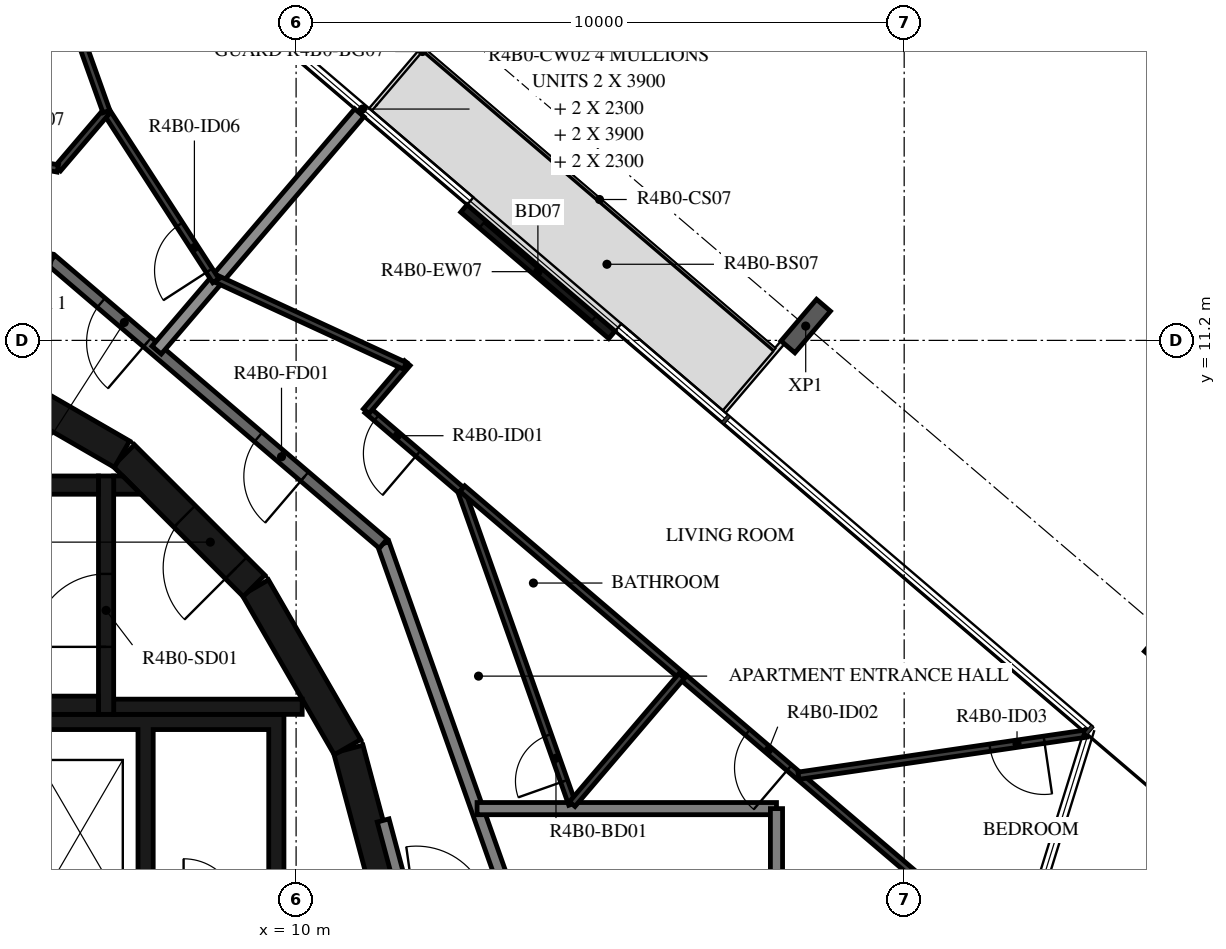
"""IFC4 building model, lengths in metres.
Left out: names, types, materials, properties, quantities, classifications, styles, units other than length and angle.
Written with IfcOpenShell. Run it as: python <this file> out.ifc"""

import sys

from ifc_helpers import new_model, si_unit, direction, frame, frame_2d, origin, origin_2d, place, context, subcontext, project, spatial, polyline, rectangle, i_section, outline, extrude, element, fill, save


model = new_model("IFC4")
c1 = context("Model", 3, precision=1e-05, world=origin(), true_north=direction((0.0, 1.0)))
c2 = subcontext(c1, "Body", "Model", "MODEL_VIEW")
j1 = project(units=[si_unit("LENGTHUNIT", "METRE"), si_unit("PLANEANGLEUNIT", "RADIAN")], contexts=[c1])
p1 = place(None, origin())
s1 = spatial("IfcSite", under=j1, at=p1, CompositionType="ELEMENT")
p2 = place(p1, origin())
s2 = spatial("IfcBuilding", under=s1, at=p2, CompositionType="ELEMENT")
p3 = place(p2, frame((0.0, 0.0, 165.7)))
s3 = spatial("IfcBuildingStorey", under=s2, at=p3, CompositionType="ELEMENT", Elevation=165.7)
for number, where, z_axis, x_axis in (
    (1, (24.358, 6.331, -0.38), (0.0, 0.0, 1.0), (0.76, -0.649, 0.0)),
    (2, (18.381, 11.436, -0.38), (0.0, 0.0, 1.0), (0.76, -0.649, 0.0)),
):
    element("IfcColumn", number, at=place(p3, frame(where, z_axis=z_axis, x_axis=x_axis)), inside=s3, PredefinedType="COLUMN", context=c2, shape_type="SweptSolid", body=[
        extrude(i_section(OverallWidth=0.3, OverallDepth=0.9, WebThickness=0.019, FlangeThickness=0.035, FilletRadius=0.03, at=origin_2d()), origin(), (0.0, 0.0, 1.0), 3.5),
    ])
p4 = place(p3, frame((15.193, 11.291, 0.0), z_axis=(0.0, 0.0, 1.0), x_axis=(-0.760391731187, 0.649464714317, 0.0)))
e3 = element("IfcWall", 3, at=p4, inside=s3, PredefinedType="STANDARD", context=c2, shape_type="SweptSolid", body=[
    extrude(rectangle(XDim=3.2, YDim=0.16, at=frame_2d((1.6, 0.0))), origin(), (0.0, 0.0, 1.0), 3.12),
])
p5 = place(p4, frame((0.4, 0.0, 0.0)))
e4 = element("IfcOpeningElement", 4, at=p5, cuts=e3, PredefinedType="OPENING", context=c2, shape_type="SweptSolid", body=[
    extrude(rectangle(XDim=2.4, YDim=2.4, at=frame_2d((1.2, 1.2))), frame((0.0, 0.09, 0.0), z_axis=(0.0, -1.0, 0.0), x_axis=(1.0, 0.0, 0.0)), (0.0, 0.0, 1.0), 0.18),
])
for number, where, z_axis, x_axis in (
    (5, (11.643, 1.55, 0.0), (0.0, 0.0, 1.0), (-0.259, 0.966, 0.0)),
    (6, (10.845, 4.51, 0.0), (0.0, 0.0, 1.0), (-0.5, 0.866, 0.0)),
):
    element("IfcWall", number, at=place(p3, frame(where, z_axis=z_axis, x_axis=x_axis)), inside=s3, PredefinedType="SHEAR", context=c2, shape_type="SweptSolid", body=[
        extrude(rectangle(XDim=3.033, YDim=0.5, at=frame_2d((1.516, 0.0))), origin(), (0.0, 0.0, 1.0), 3.12),
    ])
p6 = place(p3, frame((9.308, 7.164, 0.0), z_axis=(0.0, 0.0, 1.0), x_axis=(-0.707106781187, 0.707106781187, 0.0)))
e7 = element("IfcWall", 7, at=p6, inside=s3, PredefinedType="SHEAR", context=c2, shape_type="SweptSolid", body=[
    extrude(rectangle(XDim=3.032, YDim=0.5, at=frame_2d((1.516, 0.0))), origin(), (0.0, 0.0, 1.0), 3.12),
])
p7 = place(p6, frame((0.416, 0.0, 0.0)))
e8 = element("IfcOpeningElement", 8, at=p7, cuts=e7, PredefinedType="OPENING", context=c2, shape_type="SweptSolid", body=[
    extrude(rectangle(XDim=1.2, YDim=2.1, at=frame_2d((0.6, 1.05))), frame((0.0, 0.26, 0.0), z_axis=(0.0, -1.0, 0.0), x_axis=(1.0, 0.0, 0.0)), (0.0, 0.0, 1.0), 0.52),
])
p8 = place(p3, frame((7.137, 9.329, 0.0), z_axis=(0.0, 0.0, 1.0), x_axis=(-0.865975092491, 0.500087131594, 0.0)))
e9 = element("IfcWall", 9, at=p8, inside=s3, PredefinedType="SHEAR", context=c2, shape_type="SweptSolid", body=[
    extrude(rectangle(XDim=3.033, YDim=0.5, at=frame_2d((1.516, 0.0))), origin(), (0.0, 0.0, 1.0), 3.12),
])
for number, where, z_axis, x_axis in (
    (10, (0.0, 5.2, 0.0), (0.0, 0.0, 1.0), (1.0, 0.0, 0.0)),
    (11, (0.0, 8.82, 0.0), (0.0, 0.0, 1.0), (1.0, 0.0, 0.0)),
):
    element("IfcWall", number, at=place(p3, frame(where, z_axis=z_axis, x_axis=x_axis)), inside=s3, PredefinedType="SHEAR", context=c2, shape_type="SweptSolid", body=[
        extrude(rectangle(XDim=6.75, YDim=0.3, at=frame_2d((3.375, 0.0))), origin(), (0.0, 0.0, 1.0), 3.12),
    ])
p9 = place(p3, frame((6.875, 5.05, 0.0), z_axis=(0.0, 0.0, 1.0), x_axis=(0.0, 1.0, 0.0)))
e12 = element("IfcWall", 12, at=p9, inside=s3, PredefinedType="SHEAR", context=c2, shape_type="SweptSolid", body=[
    extrude(rectangle(XDim=3.92, YDim=0.25, at=frame_2d((1.96, 0.0))), origin(), (0.0, 0.0, 1.0), 3.12),
])
p10 = place(p9, frame((1.11, 0.0, 0.0)))
e13 = element("IfcOpeningElement", 13, at=p10, cuts=e12, PredefinedType="OPENING", context=c2, shape_type="SweptSolid", body=[
    extrude(rectangle(XDim=1.2, YDim=2.1, at=frame_2d((0.6, 1.05))), frame((0.0, 0.135, 0.0), z_axis=(0.0, -1.0, 0.0), x_axis=(1.0, 0.0, 0.0)), (0.0, 0.0, 1.0), 0.27),
])
p11 = place(p3, frame((7.0, 5.175, 0.0), z_axis=(0.0, 0.0, 1.0), x_axis=(1.0, 0.0, 0.0)))
e14 = element("IfcWall", 14, at=p11, inside=s3, PredefinedType="SHEAR", context=c2, shape_type="SweptSolid", body=[
    extrude(rectangle(XDim=3.1, YDim=0.25, at=frame_2d((1.55, 0.0))), origin(), (0.0, 0.0, 1.0), 3.12),
])
p12 = place(p3, origin())
e15 = element("IfcWall", 15, at=p12, inside=s3, PredefinedType="SHEAR", context=c2, shape_type="SweptSolid", body=[
    extrude(outline(polyline([(7.448, 8.67), (7.0, 8.67), (7.0, 8.97), (7.148, 8.97), (7.448, 8.67)])), origin(), (0.0, 0.0, 1.0), 3.12),
])
p13 = place(p3, origin())
e16 = element("IfcWall", 16, at=p13, inside=s3, PredefinedType="SHEAR", context=c2, shape_type="SweptSolid", body=[
    extrude(outline(polyline([(-9.55, 4.8), (-5.5, 4.8), (-5.5, 1.9), (-5.25, 1.9), (-5.25, 4.8), (-1.2, 4.8), (-1.2, 1.9), (-0.95, 1.9), (-0.95, 4.8), (0.95, 4.8), (0.95, 1.9), (1.2, 1.9), (1.2, 4.8), (3.1, 4.8), (3.1, 1.9), (3.35, 1.9), (3.35, 4.8), (5.25, 4.8), (5.25, 1.9), (5.5, 1.9), (5.5, 4.8), (7.4, 4.8), (7.4, 1.9), (7.65, 1.9), (7.65, 4.8), (9.55, 4.8), (9.55, 1.9), (9.8, 1.9), (9.8, 4.8), (9.8, 5.05), (-9.8, 5.05), (-9.8, 4.8), (-9.8, 1.9), (-9.55, 1.9), (-9.55, 4.8)])), origin(), (0.0, 0.0, 1.0), 3.12),
])
p14 = place(p3, frame((11.87, 1.668, 0.0), z_axis=(0.0, 0.0, 1.0), x_axis=(-0.258836880648, 0.965921047093, 0.0)))
e17 = element("IfcWall", 17, at=p14, inside=s3, PredefinedType="STANDARD", context=c2, shape_type="SweptSolid", body=[
    extrude(rectangle(XDim=1.695, YDim=0.2, at=frame_2d((0.848, 0.0))), origin(), (0.0, 0.0, 1.0), 3.12),
])
p15 = place(p3, frame((13.542, 1.903, 0.0), z_axis=(0.0, 0.0, 1.0), x_axis=(-0.333808508206, 0.942640907159, 0.0)))
e18 = element("IfcWall", 18, at=p15, inside=s3, PredefinedType="STANDARD", context=c2, shape_type="SweptSolid", body=[
    extrude(rectangle(XDim=6.317, YDim=0.2, at=frame_2d((3.158, 0.0))), origin(), (0.0, 0.0, 1.0), 3.12),
])
p16 = place(p3, frame((11.433, 7.858, 0.0), z_axis=(0.0, 0.0, 1.0), x_axis=(-0.760412154545, 0.649440801937, 0.0)))
e19 = element("IfcWall", 19, at=p16, inside=s3, PredefinedType="STANDARD", context=c2, shape_type="SweptSolid", body=[
    extrude(rectangle(XDim=7.181, YDim=0.2, at=frame_2d((3.59, 0.0))), origin(), (0.0, 0.0, 1.0), 3.12),
])
p17 = place(p16, frame((1.7, 0.0, 0.0)))
e20 = element("IfcOpeningElement", 20, at=p17, cuts=e19, PredefinedType="OPENING", context=c2, shape_type="SweptSolid", body=[
    extrude(rectangle(XDim=1.0, YDim=2.1, at=frame_2d((0.5, 1.05))), frame((0.0, 0.11, 0.0), z_axis=(0.0, -1.0, 0.0), x_axis=(1.0, 0.0, 0.0)), (0.0, 0.0, 1.0), 0.22),
])
p18 = place(p16, frame((5.101, 0.0, 0.0)))
e21 = element("IfcOpeningElement", 21, at=p18, cuts=e19, PredefinedType="OPENING", context=c2, shape_type="SweptSolid", body=[
    extrude(rectangle(XDim=1.0, YDim=2.1, at=frame_2d((0.5, 1.05))), frame((0.0, 0.11, 0.0), z_axis=(0.0, -1.0, 0.0), x_axis=(1.0, 0.0, 0.0)), (0.0, 0.0, 1.0), 0.22),
])
p19 = place(p3, frame((17.9, 3.5, 0.0), z_axis=(0.0, 0.0, 1.0), x_axis=(-1.0, 0.0, 0.0)))
e22 = element("IfcWall", 22, at=p19, inside=s3, PredefinedType="STANDARD", context=c2, shape_type="SweptSolid", body=[
    extrude(rectangle(XDim=4.924, YDim=0.2, at=frame_2d((2.462, 0.0))), origin(), (0.0, 0.0, 1.0), 3.12),
])
p20 = place(p3, frame((17.9, -3.318, 0.0), z_axis=(0.0, 0.0, 1.0), x_axis=(0.0, 1.0, 0.0)))
e23 = element("IfcWall", 23, at=p20, inside=s3, PredefinedType="STANDARD", context=c2, shape_type="SweptSolid", body=[
    extrude(rectangle(XDim=6.818, YDim=0.2, at=frame_2d((3.409, 0.0))), origin(), (0.0, 0.0, 1.0), 3.12),
])
p21 = place(p3, frame((11.04, 14.943, 0.0), z_axis=(0.0, 0.0, 1.0), x_axis=(-0.649442880087, -0.760410379666, 0.0)))
e24 = element("IfcWall", 24, at=p21, inside=s3, PredefinedType="STANDARD", context=c2, shape_type="SweptSolid", body=[
    extrude(rectangle(XDim=5.133, YDim=0.2, at=frame_2d((2.566, 0.0))), origin(), (0.0, 0.0, 1.0), 2.73),
])
p22 = place(p3, frame((14.541, 3.575, 0.0), z_axis=(0.0, 0.0, 1.0), x_axis=(-0.333799280318, 0.942644174893, 0.0)))
e25 = element("IfcWall", 25, at=p22, inside=s3, PredefinedType="PARTITIONING", context=c2, shape_type="SweptSolid", body=[
    extrude(rectangle(XDim=5.477, YDim=0.12, at=frame_2d((2.738, 0.0))), origin(), (0.0, 0.0, 1.0), 3.12),
])
p23 = place(p22, frame((0.4, 0.0, 0.0)))
e26 = element("IfcOpeningElement", 26, at=p23, cuts=e25, PredefinedType="OPENING", context=c2, shape_type="SweptSolid", body=[
    extrude(rectangle(XDim=0.8, YDim=2.1, at=frame_2d((0.4, 1.05))), frame((0.0, 0.07, 0.0), z_axis=(0.0, -1.0, 0.0), x_axis=(1.0, 0.0, 0.0)), (0.0, 0.0, 1.0), 0.14),
])
p24 = place(p3, frame((12.713, 8.737, 0.0), z_axis=(0.0, 0.0, 1.0), x_axis=(-0.760410825807, 0.649442357716, 0.0)))
e27 = element("IfcWall", 27, at=p24, inside=s3, PredefinedType="PARTITIONING", context=c2, shape_type="SweptSolid", body=[
    extrude(rectangle(XDim=2.029, YDim=0.12, at=frame_2d((1.014, 0.0))), origin(), (0.0, 0.0, 1.0), 3.12),
])
p25 = place(p24, frame((0.929, 0.0, 0.0)))
e28 = element("IfcOpeningElement", 28, at=p25, cuts=e27, PredefinedType="OPENING", context=c2, shape_type="SweptSolid", body=[
    extrude(rectangle(XDim=0.9, YDim=2.1, at=frame_2d((0.45, 1.05))), frame((0.0, 0.07, 0.0), z_axis=(0.0, -1.0, 0.0), x_axis=(1.0, 0.0, 0.0)), (0.0, 0.0, 1.0), 0.14),
])
p26 = place(p3, frame((12.734, 8.762, 0.0), z_axis=(0.0, 0.0, 1.0), x_axis=(0.760390484255, -0.649466174219, 0.0)))
e29 = element("IfcWall", 29, at=p26, inside=s3, PredefinedType="PARTITIONING", context=c2, shape_type="SweptSolid", body=[
    extrude(rectangle(XDim=4.783, YDim=0.12, at=frame_2d((2.391, 0.0))), origin(), (0.0, 0.0, 1.0), 3.12),
])
p27 = place(p3, frame((11.153, 10.034, 0.0), z_axis=(0.0, 0.0, 1.0), x_axis=(0.649381401329, 0.760462882466, 0.0)))
e30 = element("IfcWall", 30, at=p27, inside=s3, PredefinedType="PARTITIONING", context=c2, shape_type="SweptSolid", body=[
    extrude(rectangle(XDim=1.042, YDim=0.12, at=frame_2d((0.521, 0.0))), origin(), (0.0, 0.0, 1.0), 3.12),
])
p28 = place(p3, frame((11.79, 10.781, 0.0), z_axis=(0.0, 0.0, 1.0), x_axis=(-0.907999296286, 0.418971691101, 0.0)))
e31 = element("IfcWall", 31, at=p28, inside=s3, PredefinedType="PARTITIONING", context=c2, shape_type="SweptSolid", body=[
    extrude(rectangle(XDim=3.401, YDim=0.12, at=frame_2d((1.701, 0.0))), origin(), (0.0, 0.0, 1.0), 3.12),
])
p29 = place(p3, frame((23.411, -0.357, 0.0), z_axis=(0.0, 0.0, 1.0), x_axis=(-0.76041871148, 0.649433124525, 0.0)))
e32 = element("IfcWall", 32, at=p29, inside=s3, PredefinedType="PARTITIONING", context=c2, shape_type="SweptSolid", body=[
    extrude(rectangle(XDim=9.259, YDim=0.12, at=frame_2d((4.629, 0.0))), origin(), (0.0, 0.0, 1.0), 3.12),
])
p30 = place(p29, frame((6.972, 0.0, 0.0)))
e33 = element("IfcOpeningElement", 33, at=p30, cuts=e32, PredefinedType="OPENING", context=c2, shape_type="SweptSolid", body=[
    extrude(rectangle(XDim=0.9, YDim=2.1, at=frame_2d((0.45, 1.05))), frame((0.0, 0.07, 0.0), z_axis=(0.0, -1.0, 0.0), x_axis=(1.0, 0.0, 0.0)), (0.0, 0.0, 1.0), 0.14),
])
p31 = place(p29, frame((0.2, 0.0, 0.0)))
e34 = element("IfcOpeningElement", 34, at=p31, cuts=e32, PredefinedType="OPENING", context=c2, shape_type="SweptSolid", body=[
    extrude(rectangle(XDim=0.9, YDim=2.1, at=frame_2d((0.45, 1.05))), frame((0.0, 0.07, 0.0), z_axis=(0.0, -1.0, 0.0), x_axis=(1.0, 0.0, 0.0)), (0.0, 0.0, 1.0), 0.14),
])
p32 = place(p3, frame((16.341, 5.682, 0.0), z_axis=(0.0, 0.0, 1.0), x_axis=(-0.64946993237, -0.76038727432, 0.0)))
e35 = element("IfcWall", 35, at=p32, inside=s3, PredefinedType="PARTITIONING", context=c2, shape_type="SweptSolid", body=[
    extrude(rectangle(XDim=2.771, YDim=0.12, at=frame_2d((1.386, 0.0))), origin(), (0.0, 0.0, 1.0), 3.12),
])
p33 = place(p3, frame((22.994, 4.734, 0.0), z_axis=(0.0, 0.0, 1.0), x_axis=(-0.989449286977, -0.144879634529, 0.0)))
e36 = element("IfcWall", 36, at=p33, inside=s3, PredefinedType="PARTITIONING", context=c2, shape_type="SweptSolid", body=[
    extrude(rectangle(XDim=4.782, YDim=0.12, at=frame_2d((2.391, 0.0))), origin(), (0.0, 0.0, 1.0), 3.12),
])
p34 = place(p33, frame((0.7, 0.0, 0.0)))
e37 = element("IfcOpeningElement", 37, at=p34, cuts=e36, PredefinedType="OPENING", context=c2, shape_type="SweptSolid", body=[
    extrude(rectangle(XDim=0.9, YDim=2.1, at=frame_2d((0.45, 1.05))), frame((0.0, 0.07, 0.0), z_axis=(0.0, -1.0, 0.0), x_axis=(1.0, 0.0, 0.0)), (0.0, 0.0, 1.0), 0.14),
])
p35 = place(p3, frame((8.681, 12.181, 0.0), z_axis=(0.0, 0.0, 1.0), x_axis=(-0.543187118914, 0.839611668479, 0.0)))
e38 = element("IfcWall", 38, at=p35, inside=s3, PredefinedType="PARTITIONING", context=c2, shape_type="SweptSolid", body=[
    extrude(rectangle(XDim=3.313, YDim=0.12, at=frame_2d((1.657, 0.0))), origin(), (0.0, 0.0, 1.0), 3.12),
])
p36 = place(p35, frame((0.2, 0.0, 0.0)))
e39 = element("IfcOpeningElement", 39, at=p36, cuts=e38, PredefinedType="OPENING", context=c2, shape_type="SweptSolid", body=[
    extrude(rectangle(XDim=0.9, YDim=2.1, at=frame_2d((0.45, 1.05))), frame((0.0, 0.07, 0.0), z_axis=(0.0, -1.0, 0.0), x_axis=(1.0, 0.0, 0.0)), (0.0, 0.0, 1.0), 0.14),
])
p37 = place(p3, frame((6.881, 14.963, 0.0), z_axis=(0.0, 0.0, 1.0), x_axis=(-0.649402250594, -0.760445078177, 0.0)))
e40 = element("IfcWall", 40, at=p37, inside=s3, PredefinedType="PARTITIONING", context=c2, shape_type="SweptSolid", body=[
    extrude(rectangle(XDim=1.231, YDim=0.12, at=frame_2d((0.616, 0.0))), origin(), (0.0, 0.0, 1.0), 3.12),
])
p38 = place(p3, frame((6.081, 14.027, 0.0), z_axis=(0.0, 0.0, 1.0), x_axis=(-0.983250989832, 0.182256662416, 0.0)))
e41 = element("IfcWall", 41, at=p38, inside=s3, PredefinedType="PARTITIONING", context=c2, shape_type="SweptSolid", body=[
    extrude(rectangle(XDim=7.416, YDim=0.12, at=frame_2d((3.708, 0.0))), origin(), (0.0, 0.0, 1.0), 3.12),
])
p39 = place(p38, frame((0.2, 0.0, 0.0)))
e42 = element("IfcOpeningElement", 42, at=p39, cuts=e41, PredefinedType="OPENING", context=c2, shape_type="SweptSolid", body=[
    extrude(rectangle(XDim=0.9, YDim=2.1, at=frame_2d((0.45, 1.05))), frame((0.0, 0.07, 0.0), z_axis=(0.0, -1.0, 0.0), x_axis=(1.0, 0.0, 0.0)), (0.0, 0.0, 1.0), 0.14),
])
p40 = place(p38, frame((4.065, 0.0, 0.0)))
e43 = element("IfcOpeningElement", 43, at=p40, cuts=e41, PredefinedType="OPENING", context=c2, shape_type="SweptSolid", body=[
    extrude(rectangle(XDim=0.8, YDim=2.1, at=frame_2d((0.4, 1.05))), frame((0.0, 0.07, 0.0), z_axis=(0.0, -1.0, 0.0), x_axis=(1.0, 0.0, 0.0)), (0.0, 0.0, 1.0), 0.14),
])
p41 = place(p3, frame((5.043, 20.105, 0.0), z_axis=(0.0, 0.0, 1.0), x_axis=(0.336608273763, -0.941644768495, 0.0)))
e44 = element("IfcWall", 44, at=p41, inside=s3, PredefinedType="PARTITIONING", context=c2, shape_type="SweptSolid", body=[
    extrude(rectangle(XDim=5.461, YDim=0.12, at=frame_2d((2.73, 0.0))), origin(), (0.0, 0.0, 1.0), 3.12),
])
p42 = place(p5, origin())
e45 = element("IfcDoor", 45, at=p42, inside=s3, OperationType="DOUBLE_DOOR_SLIDING", PredefinedType="DOOR", context=c2, shape_type="SweptSolid", body=[
    extrude(rectangle(XDim=2.4, YDim=2.4, at=frame_2d((1.2, 1.2))), frame((0.0, 0.025, 0.0), z_axis=(0.0, -1.0, 0.0), x_axis=(1.0, 0.0, 0.0)), (0.0, 0.0, 1.0), 0.05),
])
fill(e4, e45)
p43 = place(p10, origin())
e46 = element("IfcDoor", 46, at=p43, inside=s3, OperationType="SINGLE_SWING_LEFT", PredefinedType="DOOR", context=c2, shape_type="SweptSolid", body=[
    extrude(rectangle(XDim=1.2, YDim=2.1, at=frame_2d((0.6, 1.05))), frame((0.0, 0.025, 0.0), z_axis=(0.0, -1.0, 0.0), x_axis=(1.0, 0.0, 0.0)), (0.0, 0.0, 1.0), 0.05),
])
fill(e13, e46)
p44 = place(p7, origin())
e47 = element("IfcDoor", 47, at=p44, inside=s3, OperationType="SINGLE_SWING_RIGHT", PredefinedType="DOOR", context=c2, shape_type="SweptSolid", body=[
    extrude(rectangle(XDim=1.2, YDim=2.1, at=frame_2d((0.6, 1.05))), frame((0.0, 0.025, 0.0), z_axis=(0.0, -1.0, 0.0), x_axis=(1.0, 0.0, 0.0)), (0.0, 0.0, 1.0), 0.05),
])
fill(e8, e47)
p45 = place(p17, origin())
e48 = element("IfcDoor", 48, at=p45, inside=s3, OperationType="SINGLE_SWING_LEFT", PredefinedType="DOOR", context=c2, shape_type="SweptSolid", body=[
    extrude(rectangle(XDim=1.0, YDim=2.1, at=frame_2d((0.5, 1.05))), frame((0.0, 0.025, 0.0), z_axis=(0.0, -1.0, 0.0), x_axis=(1.0, 0.0, 0.0)), (0.0, 0.0, 1.0), 0.05),
])
fill(e20, e48)
p46 = place(p23, origin())
e49 = element("IfcDoor", 49, at=p46, inside=s3, OperationType="SINGLE_SWING_LEFT", PredefinedType="DOOR", context=c2, shape_type="SweptSolid", body=[
    extrude(rectangle(XDim=0.8, YDim=2.1, at=frame_2d((0.4, 1.05))), frame((0.0, 0.025, 0.0), z_axis=(0.0, -1.0, 0.0), x_axis=(1.0, 0.0, 0.0)), (0.0, 0.0, 1.0), 0.05),
])
fill(e26, e49)
p47 = place(p25, origin())
e50 = element("IfcDoor", 50, at=p47, inside=s3, OperationType="SINGLE_SWING_LEFT", PredefinedType="DOOR", context=c2, shape_type="SweptSolid", body=[
    extrude(rectangle(XDim=0.9, YDim=2.1, at=frame_2d((0.45, 1.05))), frame((0.0, 0.025, 0.0), z_axis=(0.0, -1.0, 0.0), x_axis=(1.0, 0.0, 0.0)), (0.0, 0.0, 1.0), 0.05),
])
fill(e28, e50)
p48 = place(p30, origin())
e51 = element("IfcDoor", 51, at=p48, inside=s3, OperationType="SINGLE_SWING_RIGHT", PredefinedType="DOOR", context=c2, shape_type="SweptSolid", body=[
    extrude(rectangle(XDim=0.9, YDim=2.1, at=frame_2d((0.45, 1.05))), frame((0.0, 0.025, 0.0), z_axis=(0.0, -1.0, 0.0), x_axis=(1.0, 0.0, 0.0)), (0.0, 0.0, 1.0), 0.05),
])
fill(e33, e51)
p49 = place(p34, origin())
e52 = element("IfcDoor", 52, at=p49, inside=s3, OperationType="SINGLE_SWING_LEFT", PredefinedType="DOOR", context=c2, shape_type="SweptSolid", body=[
    extrude(rectangle(XDim=0.9, YDim=2.1, at=frame_2d((0.45, 1.05))), frame((0.0, 0.025, 0.0), z_axis=(0.0, -1.0, 0.0), x_axis=(1.0, 0.0, 0.0)), (0.0, 0.0, 1.0), 0.05),
])
fill(e37, e52)
p50 = place(p18, origin())
e53 = element("IfcDoor", 53, at=p50, inside=s3, OperationType="SINGLE_SWING_RIGHT", PredefinedType="DOOR", context=c2, shape_type="SweptSolid", body=[
    extrude(rectangle(XDim=1.0, YDim=2.1, at=frame_2d((0.5, 1.05))), frame((0.0, 0.025, 0.0), z_axis=(0.0, -1.0, 0.0), x_axis=(1.0, 0.0, 0.0)), (0.0, 0.0, 1.0), 0.05),
])
fill(e21, e53)
p51 = place(p36, origin())
e54 = element("IfcDoor", 54, at=p51, inside=s3, OperationType="SINGLE_SWING_RIGHT", PredefinedType="DOOR", context=c2, shape_type="SweptSolid", body=[
    extrude(rectangle(XDim=0.9, YDim=2.1, at=frame_2d((0.45, 1.05))), frame((0.0, 0.025, 0.0), z_axis=(0.0, -1.0, 0.0), x_axis=(1.0, 0.0, 0.0)), (0.0, 0.0, 1.0), 0.05),
])
fill(e39, e54)
save(model, sys.argv[1])
